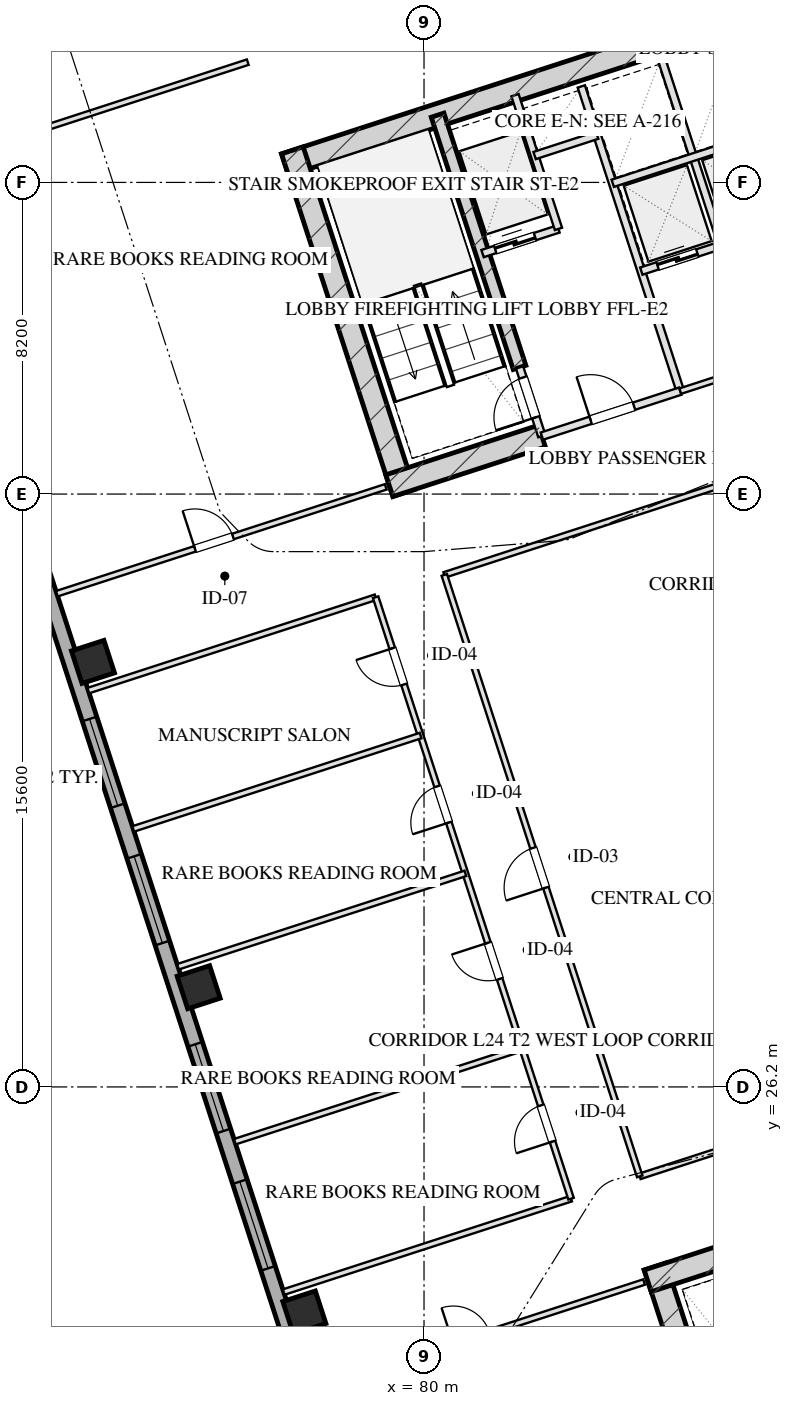
"""IFC4 building model, lengths in metres.
Left out: names, types, materials, properties, quantities, classifications, styles, units other than length and angle.
Written with IfcOpenShell. Run it as: python <this file> out.ifc"""

import sys

from ifc_helpers import new_model, si_unit, direction, frame, frame_2d, origin, origin_2d, place, context, subcontext, project, spatial, rectangle, hollow_rectangle, extrude, element, fill, save


model = new_model("IFC4")
c1 = context("Model", 3, precision=1e-05, world=origin(), true_north=direction((0.0, 1.0)))
c2 = subcontext(c1, "Body", "Model", "MODEL_VIEW")
j1 = project(units=[si_unit("LENGTHUNIT", "METRE"), si_unit("PLANEANGLEUNIT", "RADIAN")], contexts=[c1])
p1 = place(None, origin())
s1 = spatial("IfcSite", under=j1, at=p1, CompositionType="ELEMENT")
p2 = place(p1, origin())
s2 = spatial("IfcBuilding", under=s1, at=p2, CompositionType="ELEMENT")
p3 = place(p2, frame((0.0, 0.0, 96.6)))
s3 = spatial("IfcBuildingStorey", under=s2, at=p3, CompositionType="ELEMENT", Elevation=96.6)
p4 = place(p3, frame((86.078, 21.475, 0.0), z_axis=(0.0, 0.0, 1.0), x_axis=(0.309017938678, -0.951056209472, 0.0)))
e1 = element("IfcWall", 1, at=p4, inside=s3, PredefinedType="SHEAR", context=c2, shape_type="SweptSolid", body=[
    extrude(rectangle(XDim=9.48, YDim=0.6, at=frame_2d((4.74, 0.0))), origin(), (0.0, 0.0, 1.0), 3.45),
])
p5 = place(p3, frame((85.886, 21.097, 0.0), z_axis=(0.0, 0.0, 1.0), x_axis=(0.951068073652, 0.308981422225, 0.0)))
e2 = element("IfcWall", 2, at=p5, inside=s3, PredefinedType="SHEAR", context=c2, shape_type="SweptSolid", body=[
    extrude(rectangle(XDim=4.22, YDim=0.6, at=frame_2d((2.11, 0.0))), origin(), (0.0, 0.0, 1.0), 3.45),
])
p6 = place(p3, frame((76.344, 50.466, 0.0), z_axis=(0.0, 0.0, 1.0), x_axis=(0.951055727519, 0.309019421968, 0.0)))
e3 = element("IfcWall", 3, at=p6, inside=s3, PredefinedType="SHEAR", context=c2, shape_type="SweptSolid", body=[
    extrude(rectangle(XDim=16.4, YDim=0.6, at=frame_2d((8.2, 0.0))), origin(), (0.0, 0.0, 1.0), 3.45),
])
p7 = place(p3, frame((79.466, 41.828, 0.0), z_axis=(0.0, 0.0, 1.0), x_axis=(-0.309041232772, 0.951048640421, 0.0)))
e4 = element("IfcWall", 4, at=p7, inside=s3, PredefinedType="SHEAR", context=c2, shape_type="SweptSolid", body=[
    extrude(rectangle(XDim=9.48, YDim=0.6, at=frame_2d((4.74, 0.0))), origin(), (0.0, 0.0, 1.0), 3.45),
])
p8 = place(p3, frame((82.514, 45.131, 0.0), z_axis=(0.0, 0.0, 1.0), x_axis=(-0.308988790936, 0.951065679686, 0.0)))
e5 = element("IfcWall", 5, at=p8, inside=s3, PredefinedType="SHEAR", context=c2, shape_type="SweptSolid", body=[
    extrude(rectangle(XDim=6.98, YDim=0.35, at=frame_2d((3.49, 0.0))), origin(), (0.0, 0.0, 1.0), 3.45),
])
p9 = place(p3, frame((79.087, 42.021, 0.0), z_axis=(0.0, 0.0, 1.0), x_axis=(0.951062550203, 0.3089984233, 0.0)))
e6 = element("IfcWall", 6, at=p9, inside=s3, PredefinedType="SHEAR", context=c2, shape_type="SweptSolid", body=[
    extrude(rectangle(XDim=4.22, YDim=0.6, at=frame_2d((2.11, 0.0))), origin(), (0.0, 0.0, 1.0), 3.45),
])
for number, where, z_axis, x_axis in (
    (7, (76.851, 20.264, 0.0), (0.0, 0.0, 1.0), (0.951, 0.309, 0.0)),
    (8, (74.07, 28.824, 0.0), (0.0, 0.0, 1.0), (0.951, 0.309, 0.0)),
    (9, (71.289, 37.384, 0.0), (0.0, 0.0, 1.0), (0.951, 0.309, 0.0)),
):
    element("IfcColumn", number, at=place(p3, frame(where, z_axis=z_axis, x_axis=x_axis)), inside=s3, PredefinedType="COLUMN", context=c2, shape_type="SweptSolid", body=[
        extrude(hollow_rectangle(XDim=0.9, YDim=0.9, WallThickness=0.032, at=origin_2d()), origin(), (0.0, 0.0, 1.0), 3.451),
    ])
p10 = place(p3, frame((80.716, 6.59, 0.0), z_axis=(0.0, 0.0, 1.0), x_axis=(-0.309017542002, 0.95105633836, 0.0)))
e10 = element("IfcWall", 10, at=p10, inside=s3, PredefinedType="SOLIDWALL", context=c2, shape_type="SweptSolid", body=[
    extrude(rectangle(XDim=46.4, YDim=0.4, at=frame_2d((23.2, 0.0))), origin(), (0.0, 0.0, 1.0), 2.55),
])
p11 = place(p10, frame((15.6, 0.0, 0.75)))
e11 = element("IfcOpeningElement", 11, at=p11, cuts=e10, PredefinedType="OPENING", context=c2, shape_type="SweptSolid", body=[
    extrude(rectangle(XDim=2.4, YDim=1.4, at=frame_2d((1.2, 0.7))), frame((0.0, 0.21, 0.0), z_axis=(0.0, -1.0, 0.0), x_axis=(1.0, 0.0, 0.0)), (0.0, 0.0, 1.0), 0.42),
])
p12 = place(p10, frame((19.4, 0.0, 0.75)))
e12 = element("IfcOpeningElement", 12, at=p12, cuts=e10, PredefinedType="OPENING", context=c2, shape_type="SweptSolid", body=[
    extrude(rectangle(XDim=2.4, YDim=1.4, at=frame_2d((1.2, 0.7))), frame((0.0, 0.21, 0.0), z_axis=(0.0, -1.0, 0.0), x_axis=(1.0, 0.0, 0.0)), (0.0, 0.0, 1.0), 0.42),
])
p13 = place(p10, frame((24.6, 0.0, 0.75)))
e13 = element("IfcOpeningElement", 13, at=p13, cuts=e10, PredefinedType="OPENING", context=c2, shape_type="SweptSolid", body=[
    extrude(rectangle(XDim=2.4, YDim=1.4, at=frame_2d((1.2, 0.7))), frame((0.0, 0.21, 0.0), z_axis=(0.0, -1.0, 0.0), x_axis=(1.0, 0.0, 0.0)), (0.0, 0.0, 1.0), 0.42),
])
p14 = place(p10, frame((28.4, 0.0, 0.75)))
e14 = element("IfcOpeningElement", 14, at=p14, cuts=e10, PredefinedType="OPENING", context=c2, shape_type="SweptSolid", body=[
    extrude(rectangle(XDim=2.4, YDim=1.4, at=frame_2d((1.2, 0.7))), frame((0.0, 0.21, 0.0), z_axis=(0.0, -1.0, 0.0), x_axis=(1.0, 0.0, 0.0)), (0.0, 0.0, 1.0), 0.42),
])
p15 = place(p3, frame((83.101, 43.324, 0.0), z_axis=(0.0, 0.0, 1.0), x_axis=(-0.309048298632, 0.951046344356, 0.0)))
e15 = element("IfcWall", 15, at=p15, inside=s3, PredefinedType="PARTITIONING", context=c2, shape_type="SweptSolid", body=[
    extrude(rectangle(XDim=1.9, YDim=0.2, at=frame_2d((0.95, 0.0))), origin(), (0.0, 0.0, 1.0), 3.155),
])
p16 = place(p15, frame((0.52, 0.0, 0.0)))
e16 = element("IfcOpeningElement", 16, at=p16, cuts=e15, PredefinedType="OPENING", context=c2, shape_type="SweptSolid", body=[
    extrude(rectangle(XDim=1.1, YDim=2.05, at=frame_2d((0.55, 1.025))), frame((0.0, 0.11, 0.0), z_axis=(0.0, -1.0, 0.0), x_axis=(1.0, 0.0, 0.0)), (0.0, 0.0, 1.0), 0.22),
])
p17 = place(p3, frame((86.743, 44.508, 0.0), z_axis=(0.0, 0.0, 1.0), x_axis=(-0.309016001439, 0.951056838919, 0.0)))
e17 = element("IfcWall", 17, at=p17, inside=s3, PredefinedType="PARTITIONING", context=c2, shape_type="SweptSolid", body=[
    extrude(rectangle(XDim=8.43, YDim=0.2, at=frame_2d((4.215, 0.0))), origin(), (0.0, 0.0, 1.0), 3.155),
])
p18 = place(p3, frame((83.101, 43.324, 0.0), z_axis=(0.0, 0.0, 1.0), x_axis=(0.951052804469, 0.309028417967, 0.0)))
e18 = element("IfcWall", 18, at=p18, inside=s3, PredefinedType="PARTITIONING", context=c2, shape_type="SweptSolid", body=[
    extrude(rectangle(XDim=3.83, YDim=0.2, at=frame_2d((1.915, 0.0))), origin(), (0.0, 0.0, 1.0), 3.155),
])
p19 = place(p18, frame((1.35, 0.0, 0.0)))
e19 = element("IfcOpeningElement", 19, at=p19, cuts=e18, PredefinedType="OPENING", context=c2, shape_type="SweptSolid", body=[
    extrude(rectangle(XDim=1.2, YDim=2.05, at=frame_2d((0.6, 1.025))), frame((0.0, 0.11, 0.0), z_axis=(0.0, -1.0, 0.0), x_axis=(1.0, 0.0, 0.0)), (0.0, 0.0, 1.0), 0.22),
])
p20 = place(p3, frame((81.54, 48.127, 0.0), z_axis=(0.0, 0.0, 1.0), x_axis=(0.951062257173, 0.308999325213, 0.0)))
e20 = element("IfcWall", 20, at=p20, inside=s3, PredefinedType="PARTITIONING", context=c2, shape_type="SweptSolid", body=[
    extrude(rectangle(XDim=2.1, YDim=0.2, at=frame_2d((1.05, 0.0))), origin(), (0.0, 0.0, 1.0), 3.155),
])
p21 = place(p20, frame((0.35, 0.0, 0.0)))
e21 = element("IfcOpeningElement", 21, at=p21, cuts=e20, PredefinedType="OPENING", context=c2, shape_type="SweptSolid", body=[
    extrude(rectangle(XDim=1.1, YDim=2.05, at=frame_2d((0.55, 1.025))), frame((0.0, 0.11, 0.0), z_axis=(0.0, -1.0, 0.0), x_axis=(1.0, 0.0, 0.0)), (0.0, 0.0, 1.0), 0.22),
])
p22 = place(p3, frame((83.538, 48.776, 0.0), z_axis=(0.0, 0.0, 1.0), x_axis=(-0.3089935693, 0.951064127245, 0.0)))
e22 = element("IfcWall", 22, at=p22, inside=s3, PredefinedType="PARTITIONING", context=c2, shape_type="SweptSolid", body=[
    extrude(rectangle(XDim=3.7, YDim=0.2, at=frame_2d((1.85, 0.0))), origin(), (0.0, 0.0, 1.0), 3.155),
])
p23 = place(p3, frame((82.91, 50.707, 0.0), z_axis=(0.0, 0.0, 1.0), x_axis=(0.951041328149, 0.309063734775, 0.0)))
e23 = element("IfcWall", 23, at=p23, inside=s3, PredefinedType="PARTITIONING", context=c2, shape_type="SweptSolid", body=[
    extrude(rectangle(XDim=1.73, YDim=0.2, at=frame_2d((0.865, 0.0))), origin(), (0.0, 0.0, 1.0), 3.155),
])
p24 = place(p3, frame((86.743, 44.508, 0.0), z_axis=(0.0, 0.0, 1.0), x_axis=(0.951063829732, 0.308994485023, 0.0)))
e24 = element("IfcWall", 24, at=p24, inside=s3, PredefinedType="PARTITIONING", context=c2, shape_type="SweptSolid", body=[
    extrude(rectangle(XDim=4.4, YDim=0.15, at=frame_2d((2.2, 0.0))), origin(), (0.0, 0.0, 1.0), 3.155),
])
p25 = place(p24, frame((1.45, 0.0, 0.0)))
e25 = element("IfcOpeningElement", 25, at=p25, cuts=e24, PredefinedType="OPENING", context=c2, shape_type="SweptSolid", body=[
    extrude(rectangle(XDim=1.5, YDim=2.05, at=frame_2d((0.75, 1.025))), frame((0.0, 0.085, 0.0), z_axis=(0.0, -1.0, 0.0), x_axis=(1.0, 0.0, 0.0)), (0.0, 0.0, 1.0), 0.17),
])
p26 = place(p3, frame((85.718, 47.666, 0.0), z_axis=(0.0, 0.0, 1.0), x_axis=(0.951058531764, 0.30901079133, 0.0)))
e26 = element("IfcWall", 26, at=p26, inside=s3, PredefinedType="PARTITIONING", context=c2, shape_type="SweptSolid", body=[
    extrude(rectangle(XDim=4.4, YDim=0.2, at=frame_2d((2.2, 0.0))), origin(), (0.0, 0.0, 1.0), 3.155),
])
p27 = place(p26, frame((0.45, 0.0, 0.0)))
e27 = element("IfcOpeningElement", 27, at=p27, cuts=e26, PredefinedType="OPENING", context=c2, shape_type="SweptSolid", body=[
    extrude(rectangle(XDim=1.1, YDim=2.05, at=frame_2d((0.55, 1.025))), frame((0.0, 0.11, 0.0), z_axis=(0.0, -1.0, 0.0), x_axis=(1.0, 0.0, 0.0)), (0.0, 0.0, 1.0), 0.22),
])
p28 = place(p26, frame((2.55, 0.0, 0.0)))
e28 = element("IfcOpeningElement", 28, at=p28, cuts=e26, PredefinedType="OPENING", context=c2, shape_type="SweptSolid", body=[
    extrude(rectangle(XDim=1.1, YDim=2.05, at=frame_2d((0.55, 1.025))), frame((0.0, 0.11, 0.0), z_axis=(0.0, -1.0, 0.0), x_axis=(1.0, 0.0, 0.0)), (0.0, 0.0, 1.0), 0.22),
])
p29 = place(p3, frame((87.838, 48.354, 0.0), z_axis=(0.0, 0.0, 1.0), x_axis=(-0.3090093719, 0.951058992953, 0.0)))
e29 = element("IfcWall", 29, at=p29, inside=s3, PredefinedType="PARTITIONING", context=c2, shape_type="SweptSolid", body=[
    extrude(rectangle(XDim=5.11, YDim=0.2, at=frame_2d((2.555, 0.0))), origin(), (0.0, 0.0, 1.0), 3.155),
])
p30 = place(p3, frame((84.967, 49.977, 0.0), z_axis=(0.0, 0.0, 1.0), x_axis=(0.951063829732, 0.308994485023, 0.0)))
e30 = element("IfcWall", 30, at=p30, inside=s3, PredefinedType="PARTITIONING", context=c2, shape_type="SweptSolid", body=[
    extrude(rectangle(XDim=4.4, YDim=0.2, at=frame_2d((2.2, 0.0))), origin(), (0.0, 0.0, 1.0), 3.155),
])
p31 = place(p3, frame((77.136, 18.254, 0.0), z_axis=(0.0, 0.0, 1.0), x_axis=(0.951057133767, 0.309015093986, 0.0)))
e31 = element("IfcWall", 31, at=p31, inside=s3, PredefinedType="PARTITIONING", context=c2, shape_type="SweptSolid", body=[
    extrude(rectangle(XDim=9.1, YDim=0.15, at=frame_2d((4.55, 0.0))), origin(), (0.0, 0.0, 1.0), 3.155),
])
p32 = place(p31, frame((3.822, 0.0, 0.0)))
e32 = element("IfcOpeningElement", 32, at=p32, cuts=e31, PredefinedType="OPENING", context=c2, shape_type="SweptSolid", body=[
    extrude(rectangle(XDim=1.0, YDim=2.05, at=frame_2d((0.5, 1.025))), frame((0.0, 0.085, 0.0), z_axis=(0.0, -1.0, 0.0), x_axis=(1.0, 0.0, 0.0)), (0.0, 0.0, 1.0), 0.17),
])
p33 = place(p3, frame((66.707, 50.352, 0.0), z_axis=(0.0, 0.0, 1.0), x_axis=(0.951057133767, 0.309015093986, 0.0)))
e33 = element("IfcWall", 33, at=p33, inside=s3, PredefinedType="PARTITIONING", context=c2, shape_type="SweptSolid", body=[
    extrude(rectangle(XDim=9.1, YDim=0.15, at=frame_2d((4.55, 0.0))), origin(), (0.0, 0.0, 1.0), 3.155),
])
p34 = place(p3, frame((70.338, 39.177, 0.0), z_axis=(0.0, 0.0, 1.0), x_axis=(0.951059695568, 0.309007209409, 0.0)))
e34 = element("IfcWall", 34, at=p34, inside=s3, PredefinedType="PARTITIONING", context=c2, shape_type="SweptSolid", body=[
    extrude(rectangle(XDim=9.1, YDim=0.15, at=frame_2d((4.55, 0.0))), origin(), (0.0, 0.0, 1.0), 3.155),
])
p35 = place(p34, frame((3.822, 0.0, 0.0)))
e35 = element("IfcOpeningElement", 35, at=p35, cuts=e34, PredefinedType="OPENING", context=c2, shape_type="SweptSolid", body=[
    extrude(rectangle(XDim=1.05, YDim=2.05, at=frame_2d((0.525, 1.025))), frame((0.0, 0.085, 0.0), z_axis=(0.0, -1.0, 0.0), x_axis=(1.0, 0.0, 0.0)), (0.0, 0.0, 1.0), 0.17),
])
p36 = place(p3, frame((76.308, 20.803, 0.0), z_axis=(0.0, 0.0, 1.0), x_axis=(0.95105437725, 0.3090235776, 0.0)))
e36 = element("IfcWall", 36, at=p36, inside=s3, PredefinedType="PARTITIONING", context=c2, shape_type="SweptSolid", body=[
    extrude(rectangle(XDim=7.95, YDim=0.15, at=frame_2d((3.975, 0.0))), origin(), (0.0, 0.0, 1.0), 3.155),
])
p37 = place(p3, frame((85.676, 23.847, 0.0), z_axis=(0.0, 0.0, 1.0), x_axis=(0.951063309554, 0.308996086091, 0.0)))
e37 = element("IfcWall", 37, at=p37, inside=s3, PredefinedType="PARTITIONING", context=c2, shape_type="SweptSolid", body=[
    extrude(rectangle(XDim=8.65, YDim=0.15, at=frame_2d((4.325, 0.0))), origin(), (0.0, 0.0, 1.0), 3.155),
])
p38 = place(p3, frame((71.166, 36.629, 0.0), z_axis=(0.0, 0.0, 1.0), x_axis=(0.951060470027, 0.309004825775, 0.0)))
e38 = element("IfcWall", 38, at=p38, inside=s3, PredefinedType="PARTITIONING", context=c2, shape_type="SweptSolid", body=[
    extrude(rectangle(XDim=7.95, YDim=0.15, at=frame_2d((3.975, 0.0))), origin(), (0.0, 0.0, 1.0), 3.155),
])
p39 = place(p3, frame((80.534, 39.672, 0.0), z_axis=(0.0, 0.0, 1.0), x_axis=(0.951052319652, 0.309029910015, 0.0)))
e39 = element("IfcWall", 39, at=p39, inside=s3, PredefinedType="PARTITIONING", context=c2, shape_type="SweptSolid", body=[
    extrude(rectangle(XDim=8.65, YDim=0.15, at=frame_2d((4.325, 0.0))), origin(), (0.0, 0.0, 1.0), 3.155),
])
p40 = place(p3, frame((83.869, 23.26, 0.0), z_axis=(0.0, 0.0, 1.0), x_axis=(-0.309022042254, 0.951054876125, 0.0)))
e40 = element("IfcWall", 40, at=p40, inside=s3, PredefinedType="PARTITIONING", context=c2, shape_type="SweptSolid", body=[
    extrude(rectangle(XDim=16.64, YDim=0.15, at=frame_2d((8.32, 0.0))), origin(), (0.0, 0.0, 1.0), 3.155),
])
p41 = place(p40, frame((1.58, 0.0, 0.0)))
e41 = element("IfcOpeningElement", 41, at=p41, cuts=e40, PredefinedType="OPENING", context=c2, shape_type="SweptSolid", body=[
    extrude(rectangle(XDim=1.0, YDim=2.05, at=frame_2d((0.5, 1.025))), frame((0.0, 0.085, 0.0), z_axis=(0.0, -1.0, 0.0), x_axis=(1.0, 0.0, 0.0)), (0.0, 0.0, 1.0), 0.17),
])
p42 = place(p40, frame((6.08, 0.0, 0.0)))
e42 = element("IfcOpeningElement", 42, at=p42, cuts=e40, PredefinedType="OPENING", context=c2, shape_type="SweptSolid", body=[
    extrude(rectangle(XDim=1.0, YDim=2.05, at=frame_2d((0.5, 1.025))), frame((0.0, 0.085, 0.0), z_axis=(0.0, -1.0, 0.0), x_axis=(1.0, 0.0, 0.0)), (0.0, 0.0, 1.0), 0.17),
])
p43 = place(p40, frame((10.406, 0.0, 0.0)))
e43 = element("IfcOpeningElement", 43, at=p43, cuts=e40, PredefinedType="OPENING", context=c2, shape_type="SweptSolid", body=[
    extrude(rectangle(XDim=1.0, YDim=2.05, at=frame_2d((0.5, 1.025))), frame((0.0, 0.085, 0.0), z_axis=(0.0, -1.0, 0.0), x_axis=(1.0, 0.0, 0.0)), (0.0, 0.0, 1.0), 0.17),
])
p44 = place(p40, frame((14.226, 0.0, 0.0)))
e44 = element("IfcOpeningElement", 44, at=p44, cuts=e40, PredefinedType="OPENING", context=c2, shape_type="SweptSolid", body=[
    extrude(rectangle(XDim=1.0, YDim=2.05, at=frame_2d((0.5, 1.025))), frame((0.0, 0.085, 0.0), z_axis=(0.0, -1.0, 0.0), x_axis=(1.0, 0.0, 0.0)), (0.0, 0.0, 1.0), 0.17),
])
p45 = place(p3, frame((85.676, 23.847, 0.0), z_axis=(0.0, 0.0, 1.0), x_axis=(-0.309008771245, 0.951059188113, 0.0)))
e45 = element("IfcWall", 45, at=p45, inside=s3, PredefinedType="PARTITIONING", context=c2, shape_type="SweptSolid", body=[
    extrude(rectangle(XDim=16.64, YDim=0.15, at=frame_2d((8.32, 0.0))), origin(), (0.0, 0.0, 1.0), 3.155),
])
p46 = place(p45, frame((7.987, 0.0, 0.0)))
e46 = element("IfcOpeningElement", 46, at=p46, cuts=e45, PredefinedType="OPENING", context=c2, shape_type="SweptSolid", body=[
    extrude(rectangle(XDim=1.1, YDim=2.05, at=frame_2d((0.55, 1.025))), frame((0.0, 0.085, 0.0), z_axis=(0.0, -1.0, 0.0), x_axis=(1.0, 0.0, 0.0)), (0.0, 0.0, 1.0), 0.17),
])
for number, where, z_axis, x_axis in (
    (47, (75.022, 24.76, 0.0), (0.0, 0.0, 1.0), (0.951, 0.309, 0.0)),
    (48, (73.527, 29.363, 0.0), (0.0, 0.0, 1.0), (0.951, 0.309, 0.0)),
    (49, (72.349, 32.989, 0.0), (0.0, 0.0, 1.0), (0.951, 0.309, 0.0)),
):
    element("IfcWall", number, at=place(p3, frame(where, z_axis=z_axis, x_axis=x_axis)), inside=s3, PredefinedType="PARTITIONING", context=c2, shape_type="SweptSolid", body=[
        extrude(rectangle(XDim=7.95, YDim=0.15, at=frame_2d((3.975, 0.0))), origin(), (0.0, 0.0, 1.0), 3.155),
    ])
p47 = place(p11, origin())
e50 = element("IfcWindow", 50, at=p47, inside=s3, PartitioningType="TRIPLE_PANEL_VERTICAL", PredefinedType="WINDOW", context=c2, shape_type="SweptSolid", body=[
    extrude(rectangle(XDim=2.4, YDim=1.4, at=frame_2d((1.2, 0.7))), frame((0.0, 0.03, 0.0), z_axis=(0.0, -1.0, 0.0), x_axis=(1.0, 0.0, 0.0)), (0.0, 0.0, 1.0), 0.06),
])
fill(e11, e50)
p48 = place(p12, origin())
e51 = element("IfcWindow", 51, at=p48, inside=s3, PartitioningType="TRIPLE_PANEL_VERTICAL", PredefinedType="WINDOW", context=c2, shape_type="SweptSolid", body=[
    extrude(rectangle(XDim=2.4, YDim=1.4, at=frame_2d((1.2, 0.7))), frame((0.0, 0.03, 0.0), z_axis=(0.0, -1.0, 0.0), x_axis=(1.0, 0.0, 0.0)), (0.0, 0.0, 1.0), 0.06),
])
fill(e12, e51)
p49 = place(p13, origin())
e52 = element("IfcWindow", 52, at=p49, inside=s3, PartitioningType="TRIPLE_PANEL_VERTICAL", PredefinedType="WINDOW", context=c2, shape_type="SweptSolid", body=[
    extrude(rectangle(XDim=2.4, YDim=1.4, at=frame_2d((1.2, 0.7))), frame((0.0, 0.03, 0.0), z_axis=(0.0, -1.0, 0.0), x_axis=(1.0, 0.0, 0.0)), (0.0, 0.0, 1.0), 0.06),
])
fill(e13, e52)
p50 = place(p14, origin())
e53 = element("IfcWindow", 53, at=p50, inside=s3, PartitioningType="TRIPLE_PANEL_VERTICAL", PredefinedType="WINDOW", context=c2, shape_type="SweptSolid", body=[
    extrude(rectangle(XDim=2.4, YDim=1.4, at=frame_2d((1.2, 0.7))), frame((0.0, 0.03, 0.0), z_axis=(0.0, -1.0, 0.0), x_axis=(1.0, 0.0, 0.0)), (0.0, 0.0, 1.0), 0.06),
])
fill(e14, e53)
p51 = place(p16, origin())
e54 = element("IfcDoor", 54, at=p51, inside=s3, OperationType="SINGLE_SWING_LEFT", PredefinedType="DOOR", context=c2, shape_type="SweptSolid", body=[
    extrude(rectangle(XDim=1.1, YDim=2.05, at=frame_2d((0.55, 1.025))), frame((0.0, 0.025, 0.0), z_axis=(0.0, -1.0, 0.0), x_axis=(1.0, 0.0, 0.0)), (0.0, 0.0, 1.0), 0.05),
])
fill(e16, e54)
p52 = place(p19, origin())
e55 = element("IfcDoor", 55, at=p52, inside=s3, OperationType="SINGLE_SWING_LEFT", PredefinedType="DOOR", context=c2, shape_type="SweptSolid", body=[
    extrude(rectangle(XDim=1.2, YDim=2.05, at=frame_2d((0.6, 1.025))), frame((0.0, 0.025, 0.0), z_axis=(0.0, -1.0, 0.0), x_axis=(1.0, 0.0, 0.0)), (0.0, 0.0, 1.0), 0.05),
])
fill(e19, e55)
p53 = place(p21, origin())
e56 = element("IfcDoor", 56, at=p53, inside=s3, OperationType="DOUBLE_DOOR_SLIDING", PredefinedType="DOOR", context=c2, shape_type="SweptSolid", body=[
    extrude(rectangle(XDim=1.1, YDim=2.05, at=frame_2d((0.55, 1.025))), frame((0.0, 0.025, 0.0), z_axis=(0.0, -1.0, 0.0), x_axis=(1.0, 0.0, 0.0)), (0.0, 0.0, 1.0), 0.05),
])
fill(e21, e56)
p54 = place(p27, origin())
e57 = element("IfcDoor", 57, at=p54, inside=s3, OperationType="DOUBLE_DOOR_SLIDING", PredefinedType="DOOR", context=c2, shape_type="SweptSolid", body=[
    extrude(rectangle(XDim=1.1, YDim=2.05, at=frame_2d((0.55, 1.025))), frame((0.0, 0.025, 0.0), z_axis=(0.0, -1.0, 0.0), x_axis=(1.0, 0.0, 0.0)), (0.0, 0.0, 1.0), 0.05),
])
fill(e27, e57)
p55 = place(p35, origin())
e58 = element("IfcDoor", 58, at=p55, inside=s3, OperationType="SINGLE_SWING_LEFT", PredefinedType="DOOR", context=c2, shape_type="SweptSolid", body=[
    extrude(rectangle(XDim=1.05, YDim=2.05, at=frame_2d((0.525, 1.025))), frame((0.0, 0.025, 0.0), z_axis=(0.0, -1.0, 0.0), x_axis=(1.0, 0.0, 0.0)), (0.0, 0.0, 1.0), 0.05),
])
fill(e35, e58)
p56 = place(p41, origin())
e59 = element("IfcDoor", 59, at=p56, inside=s3, OperationType="SINGLE_SWING_LEFT", PredefinedType="DOOR", context=c2, shape_type="SweptSolid", body=[
    extrude(rectangle(XDim=1.0, YDim=2.05, at=frame_2d((0.5, 1.025))), frame((0.0, 0.025, 0.0), z_axis=(0.0, -1.0, 0.0), x_axis=(1.0, 0.0, 0.0)), (0.0, 0.0, 1.0), 0.05),
])
fill(e41, e59)
p57 = place(p42, origin())
e60 = element("IfcDoor", 60, at=p57, inside=s3, OperationType="SINGLE_SWING_RIGHT", PredefinedType="DOOR", context=c2, shape_type="SweptSolid", body=[
    extrude(rectangle(XDim=1.0, YDim=2.05, at=frame_2d((0.5, 1.025))), frame((0.0, 0.025, 0.0), z_axis=(0.0, -1.0, 0.0), x_axis=(1.0, 0.0, 0.0)), (0.0, 0.0, 1.0), 0.05),
])
fill(e42, e60)
p58 = place(p43, origin())
e61 = element("IfcDoor", 61, at=p58, inside=s3, OperationType="SINGLE_SWING_LEFT", PredefinedType="DOOR", context=c2, shape_type="SweptSolid", body=[
    extrude(rectangle(XDim=1.0, YDim=2.05, at=frame_2d((0.5, 1.025))), frame((0.0, 0.025, 0.0), z_axis=(0.0, -1.0, 0.0), x_axis=(1.0, 0.0, 0.0)), (0.0, 0.0, 1.0), 0.05),
])
fill(e43, e61)
p59 = place(p44, origin())
e62 = element("IfcDoor", 62, at=p59, inside=s3, OperationType="SINGLE_SWING_RIGHT", PredefinedType="DOOR", context=c2, shape_type="SweptSolid", body=[
    extrude(rectangle(XDim=1.0, YDim=2.05, at=frame_2d((0.5, 1.025))), frame((0.0, 0.025, 0.0), z_axis=(0.0, -1.0, 0.0), x_axis=(1.0, 0.0, 0.0)), (0.0, 0.0, 1.0), 0.05),
])
fill(e44, e62)
p60 = place(p46, origin())
e63 = element("IfcDoor", 63, at=p60, inside=s3, OperationType="SINGLE_SWING_LEFT", PredefinedType="DOOR", context=c2, shape_type="SweptSolid", body=[
    extrude(rectangle(XDim=1.1, YDim=2.05, at=frame_2d((0.55, 1.025))), frame((0.0, 0.025, 0.0), z_axis=(0.0, -1.0, 0.0), x_axis=(1.0, 0.0, 0.0)), (0.0, 0.0, 1.0), 0.05),
])
fill(e46, e63)
save(model, sys.argv[1])
